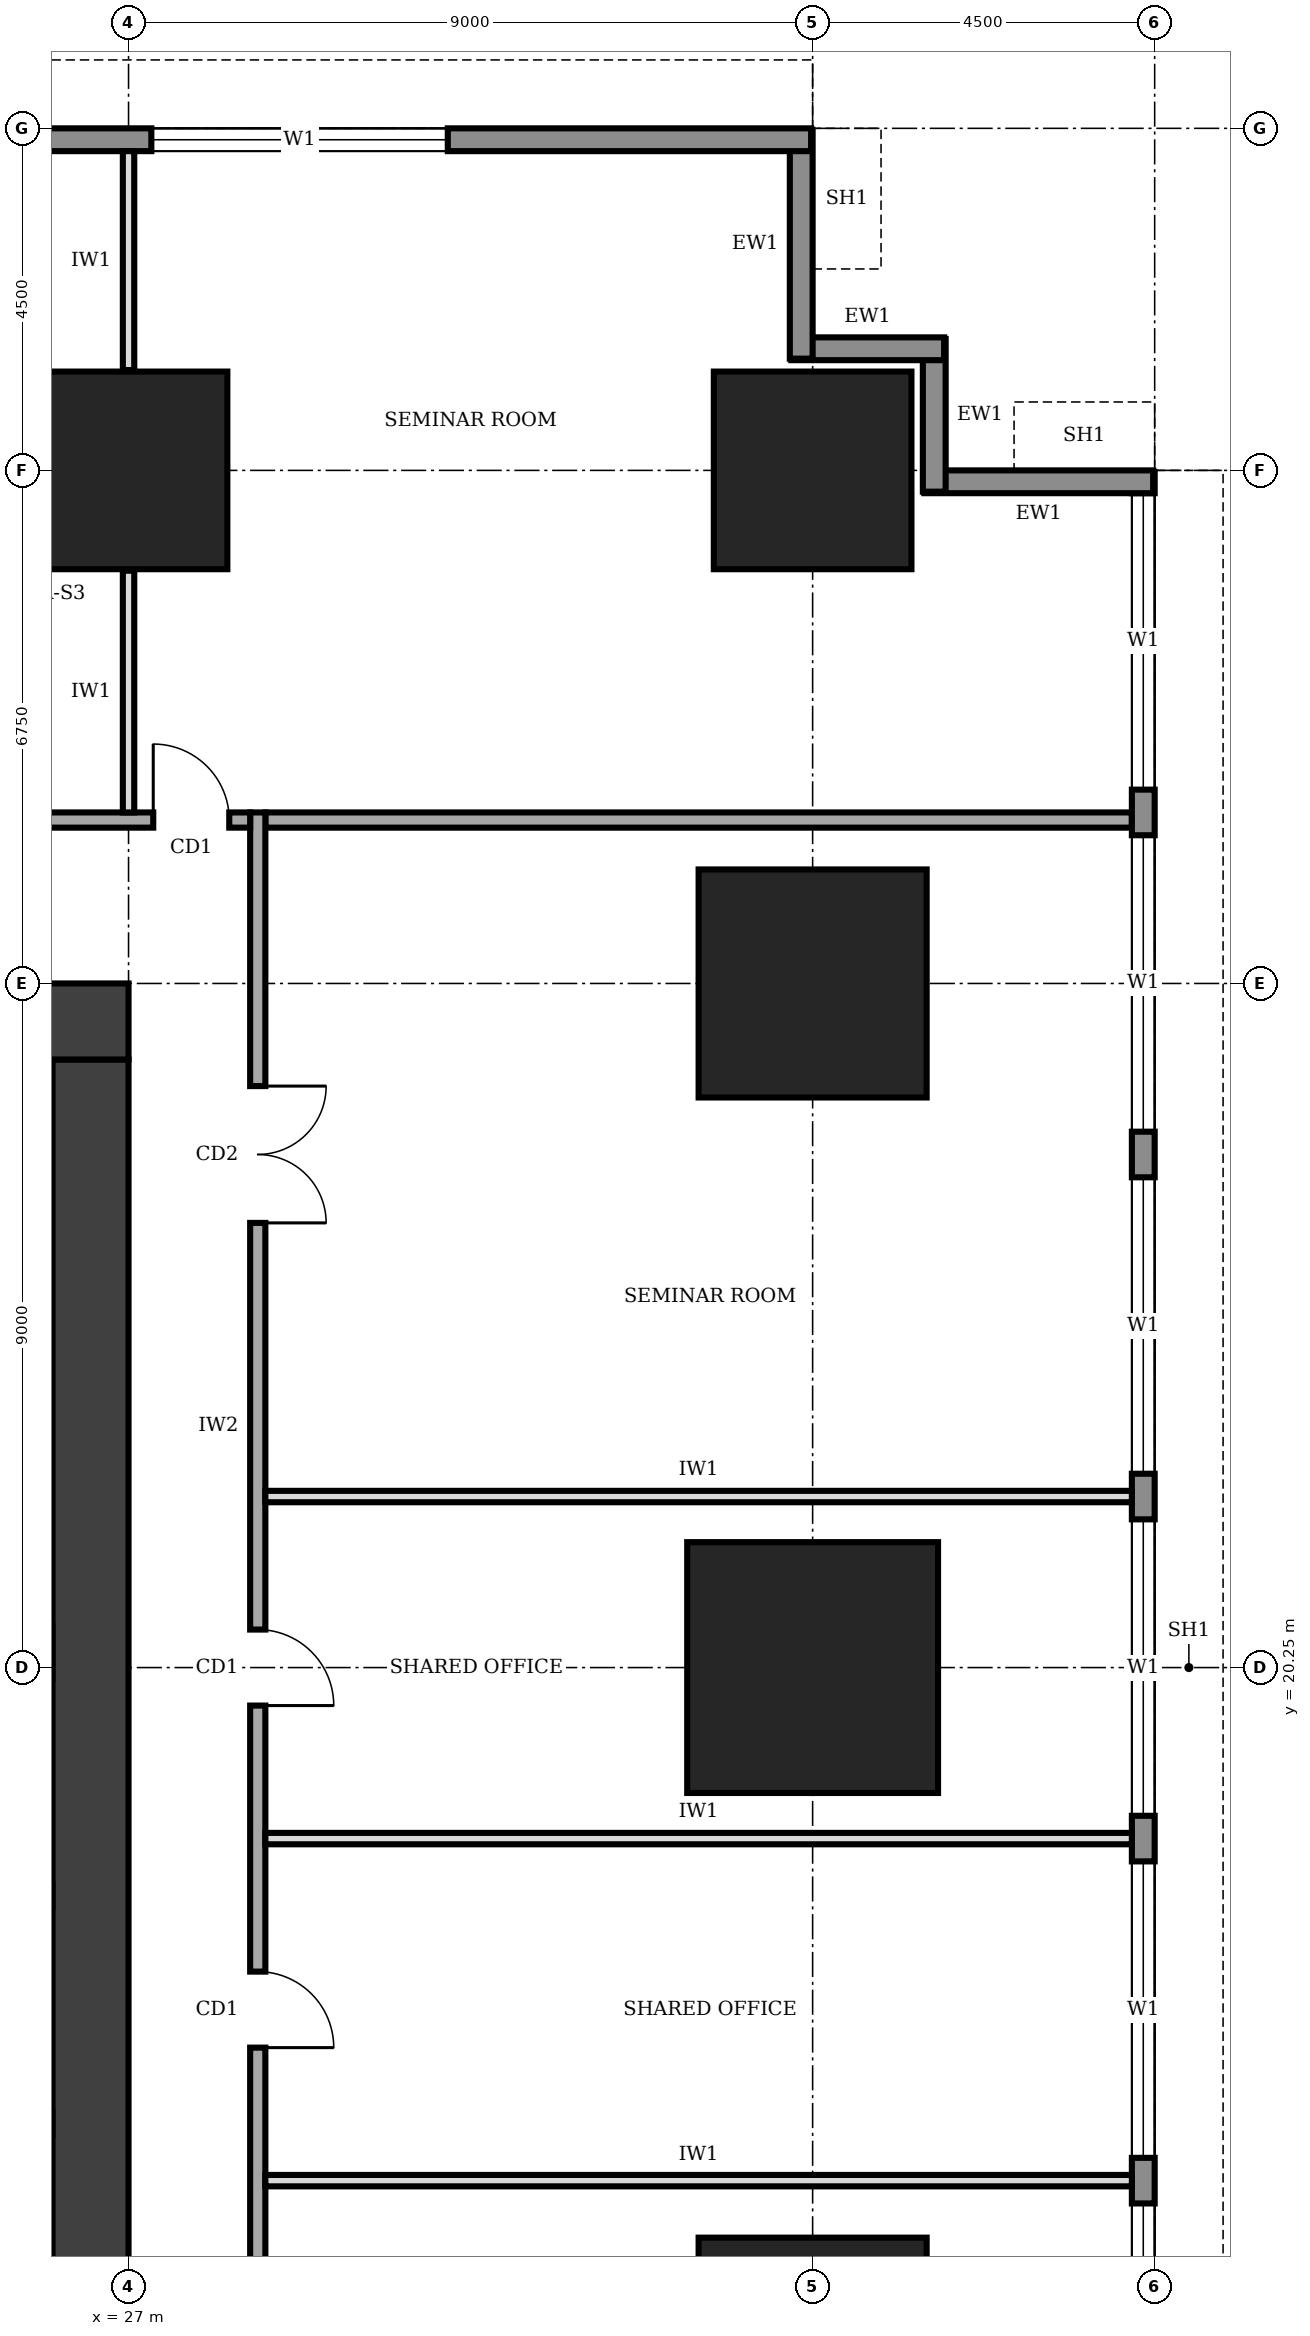
"""IFC4 building model, lengths in metres.
Left out: names, types, materials, properties, quantities, classifications, styles, units other than length and angle.
Written with IfcOpenShell. Run it as: python <this file> out.ifc"""

import sys

from ifc_helpers import new_model, si_unit, direction, frame, frame_2d, origin, origin_2d, place, context, subcontext, project, spatial, rectangle, extrude, element, fill, save


model = new_model("IFC4")
c1 = context("Model", 3, precision=1e-05, world=origin(), true_north=direction((0.0, 1.0)))
c2 = subcontext(c1, "Body", "Model", "MODEL_VIEW")
j1 = project(units=[si_unit("LENGTHUNIT", "METRE"), si_unit("PLANEANGLEUNIT", "RADIAN")], contexts=[c1])
p1 = place(None, origin())
s1 = spatial("IfcSite", under=j1, at=p1, CompositionType="ELEMENT")
p2 = place(p1, origin())
s2 = spatial("IfcBuilding", under=s1, at=p2, CompositionType="ELEMENT")
p3 = place(p2, frame((0.0, 0.0, 33.0)))
s3 = spatial("IfcBuildingStorey", under=s2, at=p3, CompositionType="ELEMENT", Elevation=33.0)
p4 = place(p3, frame((26.5, 12.25, 0.0), z_axis=(0.0, 0.0, 1.0), x_axis=(0.0, 1.0, 0.0)))
e1 = element("IfcWall", 1, at=p4, inside=s3, PredefinedType="SHEAR", context=c2, shape_type="SweptSolid", body=[
    extrude(rectangle(XDim=16.0, YDim=1.0, at=frame_2d((8.0, 0.0))), origin(), (0.0, 0.0, 1.0), 4.0),
])
p5 = place(p3, frame((27.0, 28.75, 0.0), z_axis=(0.0, 0.0, 1.0), x_axis=(-1.0, 0.0, 0.0)))
e2 = element("IfcWall", 2, at=p5, inside=s3, PredefinedType="SHEAR", context=c2, shape_type="SweptSolid", body=[
    extrude(rectangle(XDim=13.5, YDim=1.0, at=frame_2d((6.75, 0.0))), origin(), (0.0, 0.0, 1.0), 4.0),
])
p6 = place(p5, frame((4.75, 0.0, 0.0)))
e3 = element("IfcOpeningElement", 3, at=p6, cuts=e2, PredefinedType="OPENING", context=c2, shape_type="SweptSolid", body=[
    extrude(rectangle(XDim=1.8, YDim=2.1, at=frame_2d((0.9, 1.05))), frame((0.0, 0.51, 0.0), z_axis=(0.0, -1.0, 0.0), x_axis=(1.0, 0.0, 0.0)), (0.0, 0.0, 1.0), 1.02),
])
p7 = place(p3, frame((36.0, 11.25, 0.0), z_axis=(0.0, 0.0, 1.0), x_axis=(1.0, 0.0, 0.0)))
e4 = element("IfcColumn", 4, at=p7, inside=s3, PredefinedType="COLUMN", context=c2, shape_type="SweptSolid", body=[
    extrude(rectangle(XDim=3.0, YDim=3.0, at=origin_2d()), origin(), (0.0, 0.0, 1.0), 4.0),
])
p8 = place(p3, frame((36.0, 20.25, 0.0), z_axis=(0.0, 0.0, 1.0), x_axis=(1.0, 0.0, 0.0)))
e5 = element("IfcColumn", 5, at=p8, inside=s3, PredefinedType="COLUMN", context=c2, shape_type="SweptSolid", body=[
    extrude(rectangle(XDim=3.3, YDim=3.3, at=origin_2d()), origin(), (0.0, 0.0, 1.0), 4.0),
])
p9 = place(p3, frame((36.0, 29.25, 0.0), z_axis=(0.0, 0.0, 1.0), x_axis=(1.0, 0.0, 0.0)))
e6 = element("IfcColumn", 6, at=p9, inside=s3, PredefinedType="COLUMN", context=c2, shape_type="SweptSolid", body=[
    extrude(rectangle(XDim=3.0, YDim=3.0, at=origin_2d()), origin(), (0.0, 0.0, 1.0), 4.0),
])
for number, where, z_axis, x_axis in (
    (7, (27.0, 36.0, 0.0), (0.0, 0.0, 1.0), (1.0, 0.0, 0.0)),
    (8, (36.0, 36.0, 0.0), (0.0, 0.0, 1.0), (1.0, 0.0, 0.0)),
):
    element("IfcColumn", number, at=place(p3, frame(where, z_axis=z_axis, x_axis=x_axis)), inside=s3, PredefinedType="COLUMN", context=c2, shape_type="SweptSolid", body=[
        extrude(rectangle(XDim=2.6, YDim=2.6, at=origin_2d()), origin(), (0.0, 0.0, 1.0), 4.0),
    ])
p10 = place(p3, frame((40.35, 4.52, 0.0), z_axis=(0.0, 0.0, 1.0), x_axis=(0.0, 1.0, 0.0)))
e9 = element("IfcWall", 9, at=p10, inside=s3, PredefinedType="STANDARD", context=c2, shape_type="SweptSolid", body=[
    extrude(rectangle(XDim=31.46, YDim=0.3, at=frame_2d((15.73, 0.0))), origin(), (0.0, 0.0, 1.0), 3.75),
])
p11 = place(p10, frame((4.78, 0.0, 0.9)))
e10 = element("IfcOpeningElement", 10, at=p11, cuts=e9, PredefinedType="OPENING", context=c2, shape_type="SweptSolid", body=[
    extrude(rectangle(XDim=3.9, YDim=2.2, at=frame_2d((1.95, 1.1))), frame((0.0, 0.16, 0.0), z_axis=(0.0, -1.0, 0.0), x_axis=(1.0, 0.0, 0.0)), (0.0, 0.0, 1.0), 0.32),
])
p12 = place(p10, frame((9.28, 0.0, 0.9)))
e11 = element("IfcOpeningElement", 11, at=p12, cuts=e9, PredefinedType="OPENING", context=c2, shape_type="SweptSolid", body=[
    extrude(rectangle(XDim=3.9, YDim=2.2, at=frame_2d((1.95, 1.1))), frame((0.0, 0.16, 0.0), z_axis=(0.0, -1.0, 0.0), x_axis=(1.0, 0.0, 0.0)), (0.0, 0.0, 1.0), 0.32),
])
p13 = place(p10, frame((13.78, 0.0, 0.9)))
e12 = element("IfcOpeningElement", 12, at=p13, cuts=e9, PredefinedType="OPENING", context=c2, shape_type="SweptSolid", body=[
    extrude(rectangle(XDim=3.9, YDim=2.2, at=frame_2d((1.95, 1.1))), frame((0.0, 0.16, 0.0), z_axis=(0.0, -1.0, 0.0), x_axis=(1.0, 0.0, 0.0)), (0.0, 0.0, 1.0), 0.32),
])
p14 = place(p10, frame((18.28, 0.0, 0.9)))
e13 = element("IfcOpeningElement", 13, at=p14, cuts=e9, PredefinedType="OPENING", context=c2, shape_type="SweptSolid", body=[
    extrude(rectangle(XDim=3.9, YDim=2.2, at=frame_2d((1.95, 1.1))), frame((0.0, 0.16, 0.0), z_axis=(0.0, -1.0, 0.0), x_axis=(1.0, 0.0, 0.0)), (0.0, 0.0, 1.0), 0.32),
])
p15 = place(p10, frame((22.78, 0.0, 0.9)))
e14 = element("IfcOpeningElement", 14, at=p15, cuts=e9, PredefinedType="OPENING", context=c2, shape_type="SweptSolid", body=[
    extrude(rectangle(XDim=3.9, YDim=2.2, at=frame_2d((1.95, 1.1))), frame((0.0, 0.16, 0.0), z_axis=(0.0, -1.0, 0.0), x_axis=(1.0, 0.0, 0.0)), (0.0, 0.0, 1.0), 0.32),
])
p16 = place(p10, frame((27.28, 0.0, 0.9)))
e15 = element("IfcOpeningElement", 15, at=p16, cuts=e9, PredefinedType="OPENING", context=c2, shape_type="SweptSolid", body=[
    extrude(rectangle(XDim=3.9, YDim=2.2, at=frame_2d((1.95, 1.1))), frame((0.0, 0.16, 0.0), z_axis=(0.0, -1.0, 0.0), x_axis=(1.0, 0.0, 0.0)), (0.0, 0.0, 1.0), 0.32),
])
p17 = place(p3, frame((40.48, 35.85, 0.0), z_axis=(0.0, 0.0, 1.0), x_axis=(-1.0, 0.0, 0.0)))
e16 = element("IfcWall", 16, at=p17, inside=s3, PredefinedType="STANDARD", context=c2, shape_type="SweptSolid", body=[
    extrude(rectangle(XDim=3.01, YDim=0.3, at=frame_2d((1.505, 0.0))), origin(), (0.0, 0.0, 1.0), 2.85),
])
for number, where, z_axis, x_axis in (
    (17, (37.6, 35.72, 0.0), (0.0, 0.0, 1.0), (0.0, 1.0, 0.0)),
    (18, (37.73, 37.6, 0.0), (0.0, 0.0, 1.0), (-1.0, 0.0, 0.0)),
):
    element("IfcWall", number, at=place(p3, frame(where, z_axis=z_axis, x_axis=x_axis)), inside=s3, PredefinedType="STANDARD", context=c2, shape_type="SweptSolid", body=[
        extrude(rectangle(XDim=2.01, YDim=0.3, at=frame_2d((1.005, 0.0))), origin(), (0.0, 0.0, 1.0), 3.75),
    ])
p18 = place(p3, frame((35.85, 37.47, 0.0), z_axis=(0.0, 0.0, 1.0), x_axis=(0.0, 1.0, 0.0)))
e19 = element("IfcWall", 19, at=p18, inside=s3, PredefinedType="STANDARD", context=c2, shape_type="SweptSolid", body=[
    extrude(rectangle(XDim=3.01, YDim=0.3, at=frame_2d((1.505, 0.0))), origin(), (0.0, 0.0, 1.0), 2.85),
])
p19 = place(p3, frame((35.98, 40.35, 0.0), z_axis=(0.0, 0.0, 1.0), x_axis=(-1.0, 0.0, 0.0)))
e20 = element("IfcWall", 20, at=p19, inside=s3, PredefinedType="STANDARD", context=c2, shape_type="SweptSolid", body=[
    extrude(rectangle(XDim=31.46, YDim=0.3, at=frame_2d((15.73, 0.0))), origin(), (0.0, 0.0, 1.0), 3.75),
])
p20 = place(p19, frame((27.28, 0.0, 0.9)))
e21 = element("IfcOpeningElement", 21, at=p20, cuts=e20, PredefinedType="OPENING", context=c2, shape_type="SweptSolid", body=[
    extrude(rectangle(XDim=3.9, YDim=2.2, at=frame_2d((1.95, 1.1))), frame((0.0, 0.16, 0.0), z_axis=(0.0, -1.0, 0.0), x_axis=(1.0, 0.0, 0.0)), (0.0, 0.0, 1.0), 0.32),
])
p21 = place(p19, frame((22.78, 0.0, 0.9)))
e22 = element("IfcOpeningElement", 22, at=p21, cuts=e20, PredefinedType="OPENING", context=c2, shape_type="SweptSolid", body=[
    extrude(rectangle(XDim=3.9, YDim=2.2, at=frame_2d((1.95, 1.1))), frame((0.0, 0.16, 0.0), z_axis=(0.0, -1.0, 0.0), x_axis=(1.0, 0.0, 0.0)), (0.0, 0.0, 1.0), 0.32),
])
p22 = place(p19, frame((4.78, 0.0, 0.9)))
e23 = element("IfcOpeningElement", 23, at=p22, cuts=e20, PredefinedType="OPENING", context=c2, shape_type="SweptSolid", body=[
    extrude(rectangle(XDim=3.9, YDim=2.2, at=frame_2d((1.95, 1.1))), frame((0.0, 0.16, 0.0), z_axis=(0.0, -1.0, 0.0), x_axis=(1.0, 0.0, 0.0)), (0.0, 0.0, 1.0), 0.32),
])
p23 = place(p3, frame((28.7, 7.7, 0.0), z_axis=(0.0, 0.0, 1.0), x_axis=(0.0, 1.0, 0.0)))
e24 = element("IfcWall", 24, at=p23, inside=s3, PredefinedType="SOLIDWALL", context=c2, shape_type="SweptSolid", body=[
    extrude(rectangle(XDim=23.8, YDim=0.2, at=frame_2d((11.9, 0.0))), origin(), (0.0, 0.0, 1.0), 3.75),
])
p24 = place(p23, frame((2.3, 0.0, 0.0)))
e25 = element("IfcOpeningElement", 25, at=p24, cuts=e24, PredefinedType="OPENING", context=c2, shape_type="SweptSolid", body=[
    extrude(rectangle(XDim=1.0, YDim=2.1, at=frame_2d((0.5, 1.05))), frame((0.0, 0.11, 0.0), z_axis=(0.0, -1.0, 0.0), x_axis=(1.0, 0.0, 0.0)), (0.0, 0.0, 1.0), 0.22),
])
p25 = place(p23, frame((7.55, 0.0, 0.0)))
e26 = element("IfcOpeningElement", 26, at=p25, cuts=e24, PredefinedType="OPENING", context=c2, shape_type="SweptSolid", body=[
    extrude(rectangle(XDim=1.0, YDim=2.1, at=frame_2d((0.5, 1.05))), frame((0.0, 0.11, 0.0), z_axis=(0.0, -1.0, 0.0), x_axis=(1.0, 0.0, 0.0)), (0.0, 0.0, 1.0), 0.22),
])
p26 = place(p23, frame((12.05, 0.0, 0.0)))
e27 = element("IfcOpeningElement", 27, at=p26, cuts=e24, PredefinedType="OPENING", context=c2, shape_type="SweptSolid", body=[
    extrude(rectangle(XDim=1.0, YDim=2.1, at=frame_2d((0.5, 1.05))), frame((0.0, 0.11, 0.0), z_axis=(0.0, -1.0, 0.0), x_axis=(1.0, 0.0, 0.0)), (0.0, 0.0, 1.0), 0.22),
])
p27 = place(p23, frame((18.4, 0.0, 0.0)))
e28 = element("IfcOpeningElement", 28, at=p27, cuts=e24, PredefinedType="OPENING", context=c2, shape_type="SweptSolid", body=[
    extrude(rectangle(XDim=1.8, YDim=2.1, at=frame_2d((0.9, 1.05))), frame((0.0, 0.11, 0.0), z_axis=(0.0, -1.0, 0.0), x_axis=(1.0, 0.0, 0.0)), (0.0, 0.0, 1.0), 0.22),
])
p28 = place(p3, frame((28.6, 31.4, 0.0), z_axis=(0.0, 0.0, 1.0), x_axis=(-1.0, 0.0, 0.0)))
e29 = element("IfcWall", 29, at=p28, inside=s3, PredefinedType="SOLIDWALL", context=c2, shape_type="SweptSolid", body=[
    extrude(rectangle(XDim=16.9, YDim=0.2, at=frame_2d((8.45, 0.0))), origin(), (0.0, 0.0, 1.0), 3.75),
])
p29 = place(p28, frame((15.425, 0.0, 0.0)))
e30 = element("IfcOpeningElement", 30, at=p29, cuts=e29, PredefinedType="OPENING", context=c2, shape_type="SweptSolid", body=[
    extrude(rectangle(XDim=1.0, YDim=2.1, at=frame_2d((0.5, 1.05))), frame((0.0, 0.11, 0.0), z_axis=(0.0, -1.0, 0.0), x_axis=(1.0, 0.0, 0.0)), (0.0, 0.0, 1.0), 0.22),
])
p30 = place(p28, frame((12.35, 0.0, 0.0)))
e31 = element("IfcOpeningElement", 31, at=p30, cuts=e29, PredefinedType="OPENING", context=c2, shape_type="SweptSolid", body=[
    extrude(rectangle(XDim=1.0, YDim=2.1, at=frame_2d((0.5, 1.05))), frame((0.0, 0.11, 0.0), z_axis=(0.0, -1.0, 0.0), x_axis=(1.0, 0.0, 0.0)), (0.0, 0.0, 1.0), 0.22),
])
p31 = place(p28, frame((5.6, 0.0, 0.0)))
e32 = element("IfcOpeningElement", 32, at=p31, cuts=e29, PredefinedType="OPENING", context=c2, shape_type="SweptSolid", body=[
    extrude(rectangle(XDim=1.0, YDim=2.1, at=frame_2d((0.5, 1.05))), frame((0.0, 0.11, 0.0), z_axis=(0.0, -1.0, 0.0), x_axis=(1.0, 0.0, 0.0)), (0.0, 0.0, 1.0), 0.22),
])
p32 = place(p28, frame((0.275, 0.0, 0.0)))
e33 = element("IfcOpeningElement", 33, at=p32, cuts=e29, PredefinedType="OPENING", context=c2, shape_type="SweptSolid", body=[
    extrude(rectangle(XDim=1.0, YDim=2.1, at=frame_2d((0.5, 1.05))), frame((0.0, 0.11, 0.0), z_axis=(0.0, -1.0, 0.0), x_axis=(1.0, 0.0, 0.0)), (0.0, 0.0, 1.0), 0.22),
])
p33 = place(p3, frame((28.8, 31.4, 0.0), z_axis=(0.0, 0.0, 1.0), x_axis=(1.0, 0.0, 0.0)))
e34 = element("IfcWall", 34, at=p33, inside=s3, PredefinedType="SOLIDWALL", context=c2, shape_type="SweptSolid", body=[
    extrude(rectangle(XDim=11.4, YDim=0.2, at=frame_2d((5.7, 0.0))), origin(), (0.0, 0.0, 1.0), 3.75),
])
p34 = place(p3, frame((27.0, 31.5, 0.0), z_axis=(0.0, 0.0, 1.0), x_axis=(0.0, 1.0, 0.0)))
e35 = element("IfcWall", 35, at=p34, inside=s3, PredefinedType="PARTITIONING", context=c2, shape_type="SweptSolid", body=[
    extrude(rectangle(XDim=3.18, YDim=0.15, at=frame_2d((1.59, 0.0))), origin(), (0.0, 0.0, 1.0), 2.85),
])
p35 = place(p3, frame((27.0, 37.32, 0.0), z_axis=(0.0, 0.0, 1.0), x_axis=(0.0, 1.0, 0.0)))
e36 = element("IfcWall", 36, at=p35, inside=s3, PredefinedType="PARTITIONING", context=c2, shape_type="SweptSolid", body=[
    extrude(rectangle(XDim=2.88, YDim=0.15, at=frame_2d((1.44, 0.0))), origin(), (0.0, 0.0, 1.0), 2.85),
])
for number, where, z_axis, x_axis in (
    (37, (28.8, 13.5, 0.0), (0.0, 0.0, 1.0), (1.0, 0.0, 0.0)),
    (38, (28.8, 18.0, 0.0), (0.0, 0.0, 1.0), (1.0, 0.0, 0.0)),
    (39, (28.8, 22.5, 0.0), (0.0, 0.0, 1.0), (1.0, 0.0, 0.0)),
):
    element("IfcWall", number, at=place(p3, frame(where, z_axis=z_axis, x_axis=x_axis)), inside=s3, PredefinedType="PARTITIONING", context=c2, shape_type="SweptSolid", body=[
        extrude(rectangle(XDim=11.4, YDim=0.15, at=frame_2d((5.7, 0.0))), origin(), (0.0, 0.0, 1.0), 3.75),
    ])
p36 = place(p11, origin())
e40 = element("IfcWindow", 40, at=p36, inside=s3, PartitioningType="SINGLE_PANEL", PredefinedType="WINDOW", context=c2, shape_type="SweptSolid", body=[
    extrude(rectangle(XDim=3.9, YDim=2.2, at=frame_2d((1.95, 1.1))), frame((0.0, 0.03, 0.0), z_axis=(0.0, -1.0, 0.0), x_axis=(1.0, 0.0, 0.0)), (0.0, 0.0, 1.0), 0.06),
])
fill(e10, e40)
p37 = place(p12, origin())
e41 = element("IfcWindow", 41, at=p37, inside=s3, PartitioningType="SINGLE_PANEL", PredefinedType="WINDOW", context=c2, shape_type="SweptSolid", body=[
    extrude(rectangle(XDim=3.9, YDim=2.2, at=frame_2d((1.95, 1.1))), frame((0.0, 0.03, 0.0), z_axis=(0.0, -1.0, 0.0), x_axis=(1.0, 0.0, 0.0)), (0.0, 0.0, 1.0), 0.06),
])
fill(e11, e41)
p38 = place(p13, origin())
e42 = element("IfcWindow", 42, at=p38, inside=s3, PartitioningType="SINGLE_PANEL", PredefinedType="WINDOW", context=c2, shape_type="SweptSolid", body=[
    extrude(rectangle(XDim=3.9, YDim=2.2, at=frame_2d((1.95, 1.1))), frame((0.0, 0.03, 0.0), z_axis=(0.0, -1.0, 0.0), x_axis=(1.0, 0.0, 0.0)), (0.0, 0.0, 1.0), 0.06),
])
fill(e12, e42)
p39 = place(p14, origin())
e43 = element("IfcWindow", 43, at=p39, inside=s3, PartitioningType="SINGLE_PANEL", PredefinedType="WINDOW", context=c2, shape_type="SweptSolid", body=[
    extrude(rectangle(XDim=3.9, YDim=2.2, at=frame_2d((1.95, 1.1))), frame((0.0, 0.03, 0.0), z_axis=(0.0, -1.0, 0.0), x_axis=(1.0, 0.0, 0.0)), (0.0, 0.0, 1.0), 0.06),
])
fill(e13, e43)
p40 = place(p15, origin())
e44 = element("IfcWindow", 44, at=p40, inside=s3, PartitioningType="SINGLE_PANEL", PredefinedType="WINDOW", context=c2, shape_type="SweptSolid", body=[
    extrude(rectangle(XDim=3.9, YDim=2.2, at=frame_2d((1.95, 1.1))), frame((0.0, 0.03, 0.0), z_axis=(0.0, -1.0, 0.0), x_axis=(1.0, 0.0, 0.0)), (0.0, 0.0, 1.0), 0.06),
])
fill(e14, e44)
p41 = place(p16, origin())
e45 = element("IfcWindow", 45, at=p41, inside=s3, PartitioningType="SINGLE_PANEL", PredefinedType="WINDOW", context=c2, shape_type="SweptSolid", body=[
    extrude(rectangle(XDim=3.9, YDim=2.2, at=frame_2d((1.95, 1.1))), frame((0.0, 0.03, 0.0), z_axis=(0.0, -1.0, 0.0), x_axis=(1.0, 0.0, 0.0)), (0.0, 0.0, 1.0), 0.06),
])
fill(e15, e45)
p42 = place(p22, origin())
e46 = element("IfcWindow", 46, at=p42, inside=s3, PartitioningType="SINGLE_PANEL", PredefinedType="WINDOW", context=c2, shape_type="SweptSolid", body=[
    extrude(rectangle(XDim=3.9, YDim=2.2, at=frame_2d((1.95, 1.1))), frame((0.0, 0.03, 0.0), z_axis=(0.0, -1.0, 0.0), x_axis=(1.0, 0.0, 0.0)), (0.0, 0.0, 1.0), 0.06),
])
fill(e23, e46)
p43 = place(p25, frame((1.0, 0.0, 0.0), z_axis=(0.0, 0.0, 1.0), x_axis=(-1.0, 0.0, 0.0)))
e47 = element("IfcDoor", 47, at=p43, inside=s3, OperationType="SINGLE_SWING_RIGHT", PredefinedType="DOOR", context=c2, shape_type="SweptSolid", body=[
    extrude(rectangle(XDim=1.0, YDim=2.1, at=frame_2d((0.5, 1.05))), frame((0.0, 0.025, 0.0), z_axis=(0.0, -1.0, 0.0), x_axis=(1.0, 0.0, 0.0)), (0.0, 0.0, 1.0), 0.05),
])
fill(e26, e47)
p44 = place(p26, frame((1.0, 0.0, 0.0), z_axis=(0.0, 0.0, 1.0), x_axis=(-1.0, 0.0, 0.0)))
e48 = element("IfcDoor", 48, at=p44, inside=s3, OperationType="SINGLE_SWING_RIGHT", PredefinedType="DOOR", context=c2, shape_type="SweptSolid", body=[
    extrude(rectangle(XDim=1.0, YDim=2.1, at=frame_2d((0.5, 1.05))), frame((0.0, 0.025, 0.0), z_axis=(0.0, -1.0, 0.0), x_axis=(1.0, 0.0, 0.0)), (0.0, 0.0, 1.0), 0.05),
])
fill(e27, e48)
p45 = place(p27, frame((1.8, 0.0, 0.0), z_axis=(0.0, 0.0, 1.0), x_axis=(-1.0, 0.0, 0.0)))
e49 = element("IfcDoor", 49, at=p45, inside=s3, OperationType="DOUBLE_DOOR_SINGLE_SWING", PredefinedType="DOOR", context=c2, shape_type="SweptSolid", body=[
    extrude(rectangle(XDim=1.8, YDim=2.1, at=frame_2d((0.9, 1.05))), frame((0.0, 0.025, 0.0), z_axis=(0.0, -1.0, 0.0), x_axis=(1.0, 0.0, 0.0)), (0.0, 0.0, 1.0), 0.05),
])
fill(e28, e49)
p46 = place(p32, frame((1.0, 0.0, 0.0), z_axis=(0.0, 0.0, 1.0), x_axis=(-1.0, 0.0, 0.0)))
e50 = element("IfcDoor", 50, at=p46, inside=s3, OperationType="SINGLE_SWING_LEFT", PredefinedType="DOOR", context=c2, shape_type="SweptSolid", body=[
    extrude(rectangle(XDim=1.0, YDim=2.1, at=frame_2d((0.5, 1.05))), frame((0.0, 0.025, 0.0), z_axis=(0.0, -1.0, 0.0), x_axis=(1.0, 0.0, 0.0)), (0.0, 0.0, 1.0), 0.05),
])
fill(e33, e50)
save(model, sys.argv[1])
